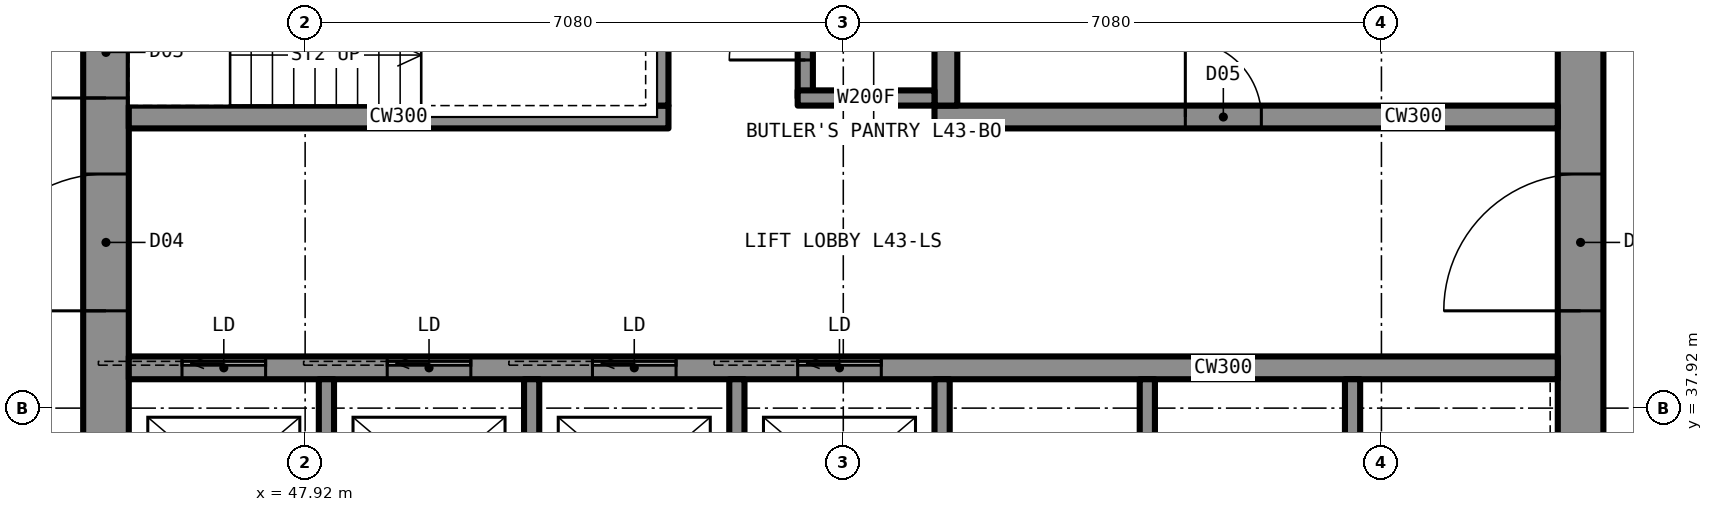
"""IFC4 building model, lengths in metres.
Left out: names, types, materials, properties, quantities, classifications, styles, units other than length and angle.
Written with IfcOpenShell. Run it as: python <this file> out.ifc"""

import sys

from ifc_helpers import new_model, si_unit, direction, frame, frame_2d, origin, place, context, subcontext, project, spatial, rectangle, extrude, element, fill, save


model = new_model("IFC4")
c1 = context("Model", 3, precision=1e-05, world=origin(), true_north=direction((0.0, 1.0)))
c2 = subcontext(c1, "Body", "Model", "MODEL_VIEW")
j1 = project(units=[si_unit("LENGTHUNIT", "METRE"), si_unit("PLANEANGLEUNIT", "RADIAN")], contexts=[c1])
p1 = place(None, origin())
s1 = spatial("IfcSite", under=j1, at=p1, CompositionType="ELEMENT")
p2 = place(p1, origin())
s2 = spatial("IfcBuilding", under=s1, at=p2, CompositionType="ELEMENT")
p3 = place(p2, frame((0.0, 0.0, 161.8)))
s3 = spatial("IfcBuildingStorey", under=s2, at=p3, CompositionType="ELEMENT", Elevation=161.8)
p4 = place(p3, frame((64.7, 35.6, 0.0), z_axis=(0.0, 0.0, 1.0), x_axis=(0.0, 1.0, 0.0)))
e1 = element("IfcWall", 1, at=p4, inside=s3, PredefinedType="SHEAR", context=c2, shape_type="SweptSolid", body=[
    extrude(rectangle(XDim=18.8, YDim=0.6, at=frame_2d((9.4, 0.0))), origin(), (0.0, 0.0, 1.0), 3.5),
])
p5 = place(p4, frame((13.4, 0.0, 0.0)))
e2 = element("IfcOpeningElement", 2, at=p5, cuts=e1, PredefinedType="OPENING", context=c2, shape_type="SweptSolid", body=[
    extrude(rectangle(XDim=1.8, YDim=2.2, at=frame_2d((0.9, 1.1))), frame((0.0, 0.31, 0.0), z_axis=(0.0, -1.0, 0.0), x_axis=(1.0, 0.0, 0.0)), (0.0, 0.0, 1.0), 0.62),
])
p6 = place(p4, frame((3.6, 0.0, 0.0)))
e3 = element("IfcOpeningElement", 3, at=p6, cuts=e1, PredefinedType="OPENING", context=c2, shape_type="SweptSolid", body=[
    extrude(rectangle(XDim=1.8, YDim=2.2, at=frame_2d((0.9, 1.1))), frame((0.0, 0.31, 0.0), z_axis=(0.0, -1.0, 0.0), x_axis=(1.0, 0.0, 0.0)), (0.0, 0.0, 1.0), 0.62),
])
p7 = place(p3, frame((45.3, 35.6, 0.0), z_axis=(0.0, 0.0, 1.0), x_axis=(0.0, 1.0, 0.0)))
e4 = element("IfcWall", 4, at=p7, inside=s3, PredefinedType="SHEAR", context=c2, shape_type="SweptSolid", body=[
    extrude(rectangle(XDim=18.8, YDim=0.6, at=frame_2d((9.4, 0.0))), origin(), (0.0, 0.0, 1.0), 3.5),
])
p8 = place(p7, frame((13.4, 0.0, 0.0)))
e5 = element("IfcOpeningElement", 5, at=p8, cuts=e4, PredefinedType="OPENING", context=c2, shape_type="SweptSolid", body=[
    extrude(rectangle(XDim=1.8, YDim=2.2, at=frame_2d((0.9, 1.1))), frame((0.0, 0.31, 0.0), z_axis=(0.0, -1.0, 0.0), x_axis=(1.0, 0.0, 0.0)), (0.0, 0.0, 1.0), 0.62),
])
p9 = place(p7, frame((3.6, 0.0, 0.0)))
e6 = element("IfcOpeningElement", 6, at=p9, cuts=e4, PredefinedType="OPENING", context=c2, shape_type="SweptSolid", body=[
    extrude(rectangle(XDim=1.8, YDim=2.2, at=frame_2d((0.9, 1.1))), frame((0.0, 0.31, 0.0), z_axis=(0.0, -1.0, 0.0), x_axis=(1.0, 0.0, 0.0)), (0.0, 0.0, 1.0), 0.62),
])
p10 = place(p7, frame((6.4, 0.0, 0.0)))
e7 = element("IfcOpeningElement", 7, at=p10, cuts=e4, PredefinedType="OPENING", context=c2, shape_type="SweptSolid", body=[
    extrude(rectangle(XDim=1.2, YDim=2.2, at=frame_2d((0.6, 1.1))), frame((0.0, 0.31, 0.0), z_axis=(0.0, -1.0, 0.0), x_axis=(1.0, 0.0, 0.0)), (0.0, 0.0, 1.0), 0.62),
])
p11 = place(p3, frame((45.6, 38.45, 0.0), z_axis=(0.0, 0.0, 1.0), x_axis=(1.0, 0.0, 0.0)))
e8 = element("IfcWall", 8, at=p11, inside=s3, PredefinedType="SHEAR", context=c2, shape_type="SweptSolid", body=[
    extrude(rectangle(XDim=18.8, YDim=0.3, at=frame_2d((9.4, 0.0))), origin(), (0.0, 0.0, 1.0), 3.5),
])
p12 = place(p11, frame((0.7, 0.0, 0.0)))
e9 = element("IfcOpeningElement", 9, at=p12, cuts=e8, PredefinedType="OPENING", context=c2, shape_type="SweptSolid", body=[
    extrude(rectangle(XDim=1.1, YDim=2.2, at=frame_2d((0.55, 1.1))), frame((0.0, 0.16, 0.0), z_axis=(0.0, -1.0, 0.0), x_axis=(1.0, 0.0, 0.0)), (0.0, 0.0, 1.0), 0.32),
])
p13 = place(p11, frame((3.4, 0.0, 0.0)))
e10 = element("IfcOpeningElement", 10, at=p13, cuts=e8, PredefinedType="OPENING", context=c2, shape_type="SweptSolid", body=[
    extrude(rectangle(XDim=1.1, YDim=2.2, at=frame_2d((0.55, 1.1))), frame((0.0, 0.16, 0.0), z_axis=(0.0, -1.0, 0.0), x_axis=(1.0, 0.0, 0.0)), (0.0, 0.0, 1.0), 0.32),
])
p14 = place(p11, frame((6.1, 0.0, 0.0)))
e11 = element("IfcOpeningElement", 11, at=p14, cuts=e8, PredefinedType="OPENING", context=c2, shape_type="SweptSolid", body=[
    extrude(rectangle(XDim=1.1, YDim=2.2, at=frame_2d((0.55, 1.1))), frame((0.0, 0.16, 0.0), z_axis=(0.0, -1.0, 0.0), x_axis=(1.0, 0.0, 0.0)), (0.0, 0.0, 1.0), 0.32),
])
p15 = place(p11, frame((8.8, 0.0, 0.0)))
e12 = element("IfcOpeningElement", 12, at=p15, cuts=e8, PredefinedType="OPENING", context=c2, shape_type="SweptSolid", body=[
    extrude(rectangle(XDim=1.1, YDim=2.2, at=frame_2d((0.55, 1.1))), frame((0.0, 0.16, 0.0), z_axis=(0.0, -1.0, 0.0), x_axis=(1.0, 0.0, 0.0)), (0.0, 0.0, 1.0), 0.32),
])
p16 = place(p3, frame((45.6, 41.75, 0.0), z_axis=(0.0, 0.0, 1.0), x_axis=(1.0, 0.0, 0.0)))
e13 = element("IfcWall", 13, at=p16, inside=s3, PredefinedType="SHEAR", context=c2, shape_type="SweptSolid", body=[
    extrude(rectangle(XDim=7.1, YDim=0.3, at=frame_2d((3.55, 0.0))), origin(), (0.0, 0.0, 1.0), 3.5),
])
p17 = place(p3, frame((56.2, 41.75, 0.0), z_axis=(0.0, 0.0, 1.0), x_axis=(1.0, 0.0, 0.0)))
e14 = element("IfcWall", 14, at=p17, inside=s3, PredefinedType="SHEAR", context=c2, shape_type="SweptSolid", body=[
    extrude(rectangle(XDim=8.2, YDim=0.3, at=frame_2d((4.1, 0.0))), origin(), (0.0, 0.0, 1.0), 3.5),
])
p18 = place(p17, frame((3.3, 0.0, 0.0)))
e15 = element("IfcOpeningElement", 15, at=p18, cuts=e14, PredefinedType="OPENING", context=c2, shape_type="SweptSolid", body=[
    extrude(rectangle(XDim=1.0, YDim=2.1, at=frame_2d((0.5, 1.05))), frame((0.0, 0.16, 0.0), z_axis=(0.0, -1.0, 0.0), x_axis=(1.0, 0.0, 0.0)), (0.0, 0.0, 1.0), 0.32),
])
p19 = place(p3, frame((52.55, 41.9, 0.0), z_axis=(0.0, 0.0, 1.0), x_axis=(0.0, 1.0, 0.0)))
e16 = element("IfcWall", 16, at=p19, inside=s3, PredefinedType="SHEAR", context=c2, shape_type="SweptSolid", body=[
    extrude(rectangle(XDim=6.2, YDim=0.3, at=frame_2d((3.1, 0.0))), origin(), (0.0, 0.0, 1.0), 3.5),
])
p20 = place(p19, frame((4.125, 0.0, 0.0)))
e17 = element("IfcOpeningElement", 17, at=p20, cuts=e16, PredefinedType="OPENING", context=c2, shape_type="SweptSolid", body=[
    extrude(rectangle(XDim=1.2, YDim=2.2, at=frame_2d((0.6, 1.1))), frame((0.0, 0.16, 0.0), z_axis=(0.0, -1.0, 0.0), x_axis=(1.0, 0.0, 0.0)), (0.0, 0.0, 1.0), 0.32),
])
p21 = place(p3, frame((56.35, 41.9, 0.0), z_axis=(0.0, 0.0, 1.0), x_axis=(0.0, 1.0, 0.0)))
e18 = element("IfcWall", 18, at=p21, inside=s3, PredefinedType="SHEAR", context=c2, shape_type="SweptSolid", body=[
    extrude(rectangle(XDim=9.5, YDim=0.3, at=frame_2d((4.75, 0.0))), origin(), (0.0, 0.0, 1.0), 3.5),
])
p22 = place(p21, frame((7.1, 0.0, 0.0)))
e19 = element("IfcOpeningElement", 19, at=p22, cuts=e18, PredefinedType="OPENING", context=c2, shape_type="SweptSolid", body=[
    extrude(rectangle(XDim=1.8, YDim=2.2, at=frame_2d((0.9, 1.1))), frame((0.0, 0.16, 0.0), z_axis=(0.0, -1.0, 0.0), x_axis=(1.0, 0.0, 0.0)), (0.0, 0.0, 1.0), 0.32),
])
p23 = place(p3, frame((54.5, 42.0, 0.0), z_axis=(0.0, 0.0, 1.0), x_axis=(0.0, 1.0, 0.0)))
e20 = element("IfcWall", 20, at=p23, inside=s3, PredefinedType="PARTITIONING", context=c2, shape_type="SweptSolid", body=[
    extrude(rectangle(XDim=2.0, YDim=0.2, at=frame_2d((1.0, 0.0))), origin(), (0.0, 0.0, 1.0), 3.33),
])
p24 = place(p23, frame((0.5, 0.0, 0.0)))
e21 = element("IfcOpeningElement", 21, at=p24, cuts=e20, PredefinedType="OPENING", context=c2, shape_type="SweptSolid", body=[
    extrude(rectangle(XDim=1.0, YDim=2.1, at=frame_2d((0.5, 1.05))), frame((0.0, 0.11, 0.0), z_axis=(0.0, -1.0, 0.0), x_axis=(1.0, 0.0, 0.0)), (0.0, 0.0, 1.0), 0.22),
])
p25 = place(p3, frame((54.4, 42.0, 0.0), z_axis=(0.0, 0.0, 1.0), x_axis=(1.0, 0.0, 0.0)))
e22 = element("IfcWall", 22, at=p25, inside=s3, PredefinedType="PARTITIONING", context=c2, shape_type="SweptSolid", body=[
    extrude(rectangle(XDim=1.8, YDim=0.2, at=frame_2d((0.9, 0.0))), origin(), (0.0, 0.0, 1.0), 3.33),
])
for number, where, z_axis, x_axis in (
    (23, (48.2, 35.6, 0.0), (0.0, 0.0, 1.0), (0.0, 1.0, 0.0)),
    (24, (50.9, 35.6, 0.0), (0.0, 0.0, 1.0), (0.0, 1.0, 0.0)),
    (25, (53.6, 35.6, 0.0), (0.0, 0.0, 1.0), (0.0, 1.0, 0.0)),
    (26, (56.3, 35.6, 0.0), (0.0, 0.0, 1.0), (0.0, 1.0, 0.0)),
    (27, (59.0, 35.6, 0.0), (0.0, 0.0, 1.0), (0.0, 1.0, 0.0)),
    (28, (61.7, 35.6, 0.0), (0.0, 0.0, 1.0), (0.0, 1.0, 0.0)),
):
    element("IfcWall", number, at=place(p3, frame(where, z_axis=z_axis, x_axis=x_axis)), inside=s3, PredefinedType="PARTITIONING", context=c2, shape_type="SweptSolid", body=[
        extrude(rectangle(XDim=2.7, YDim=0.2, at=frame_2d((1.35, 0.0))), origin(), (0.0, 0.0, 1.0), 3.33),
    ])
p26 = place(p24, origin())
e29 = element("IfcDoor", 29, at=p26, inside=s3, OperationType="SINGLE_SWING_LEFT", PredefinedType="DOOR", context=c2, shape_type="SweptSolid", body=[
    extrude(rectangle(XDim=1.0, YDim=2.1, at=frame_2d((0.5, 1.05))), frame((0.0, 0.025, 0.0), z_axis=(0.0, -1.0, 0.0), x_axis=(1.0, 0.0, 0.0)), (0.0, 0.0, 1.0), 0.05),
])
fill(e21, e29)
p27 = place(p9, origin())
e30 = element("IfcDoor", 30, at=p27, inside=s3, OperationType="DOUBLE_DOOR_SINGLE_SWING", PredefinedType="DOOR", context=c2, shape_type="SweptSolid", body=[
    extrude(rectangle(XDim=1.8, YDim=2.2, at=frame_2d((0.9, 1.1))), frame((0.0, 0.025, 0.0), z_axis=(0.0, -1.0, 0.0), x_axis=(1.0, 0.0, 0.0)), (0.0, 0.0, 1.0), 0.05),
])
fill(e6, e30)
p28 = place(p6, origin())
e31 = element("IfcDoor", 31, at=p28, inside=s3, OperationType="DOUBLE_DOOR_SINGLE_SWING", PredefinedType="DOOR", context=c2, shape_type="SweptSolid", body=[
    extrude(rectangle(XDim=1.8, YDim=2.2, at=frame_2d((0.9, 1.1))), frame((0.0, 0.025, 0.0), z_axis=(0.0, -1.0, 0.0), x_axis=(1.0, 0.0, 0.0)), (0.0, 0.0, 1.0), 0.05),
])
fill(e3, e31)
p29 = place(p10, origin())
e32 = element("IfcDoor", 32, at=p29, inside=s3, OperationType="SINGLE_SWING_LEFT", PredefinedType="DOOR", context=c2, shape_type="SweptSolid", body=[
    extrude(rectangle(XDim=1.2, YDim=2.2, at=frame_2d((0.6, 1.1))), frame((0.0, 0.025, 0.0), z_axis=(0.0, -1.0, 0.0), x_axis=(1.0, 0.0, 0.0)), (0.0, 0.0, 1.0), 0.05),
])
fill(e7, e32)
p30 = place(p18, origin())
e33 = element("IfcDoor", 33, at=p30, inside=s3, OperationType="SINGLE_SWING_LEFT", PredefinedType="DOOR", context=c2, shape_type="SweptSolid", body=[
    extrude(rectangle(XDim=1.0, YDim=2.1, at=frame_2d((0.5, 1.05))), frame((0.0, 0.025, 0.0), z_axis=(0.0, -1.0, 0.0), x_axis=(1.0, 0.0, 0.0)), (0.0, 0.0, 1.0), 0.05),
])
fill(e15, e33)
p31 = place(p12, origin())
e34 = element("IfcDoor", 34, at=p31, inside=s3, OperationType="SLIDING_TO_LEFT", PredefinedType="DOOR", context=c2, shape_type="SweptSolid", body=[
    extrude(rectangle(XDim=1.1, YDim=2.2, at=frame_2d((0.55, 1.1))), frame((0.0, 0.025, 0.0), z_axis=(0.0, -1.0, 0.0), x_axis=(1.0, 0.0, 0.0)), (0.0, 0.0, 1.0), 0.05),
])
fill(e9, e34)
p32 = place(p13, origin())
e35 = element("IfcDoor", 35, at=p32, inside=s3, OperationType="SLIDING_TO_LEFT", PredefinedType="DOOR", context=c2, shape_type="SweptSolid", body=[
    extrude(rectangle(XDim=1.1, YDim=2.2, at=frame_2d((0.55, 1.1))), frame((0.0, 0.025, 0.0), z_axis=(0.0, -1.0, 0.0), x_axis=(1.0, 0.0, 0.0)), (0.0, 0.0, 1.0), 0.05),
])
fill(e10, e35)
p33 = place(p14, origin())
e36 = element("IfcDoor", 36, at=p33, inside=s3, OperationType="SLIDING_TO_LEFT", PredefinedType="DOOR", context=c2, shape_type="SweptSolid", body=[
    extrude(rectangle(XDim=1.1, YDim=2.2, at=frame_2d((0.55, 1.1))), frame((0.0, 0.025, 0.0), z_axis=(0.0, -1.0, 0.0), x_axis=(1.0, 0.0, 0.0)), (0.0, 0.0, 1.0), 0.05),
])
fill(e11, e36)
p34 = place(p15, origin())
e37 = element("IfcDoor", 37, at=p34, inside=s3, OperationType="SLIDING_TO_LEFT", PredefinedType="DOOR", context=c2, shape_type="SweptSolid", body=[
    extrude(rectangle(XDim=1.1, YDim=2.2, at=frame_2d((0.55, 1.1))), frame((0.0, 0.025, 0.0), z_axis=(0.0, -1.0, 0.0), x_axis=(1.0, 0.0, 0.0)), (0.0, 0.0, 1.0), 0.05),
])
fill(e12, e37)
save(model, sys.argv[1])
